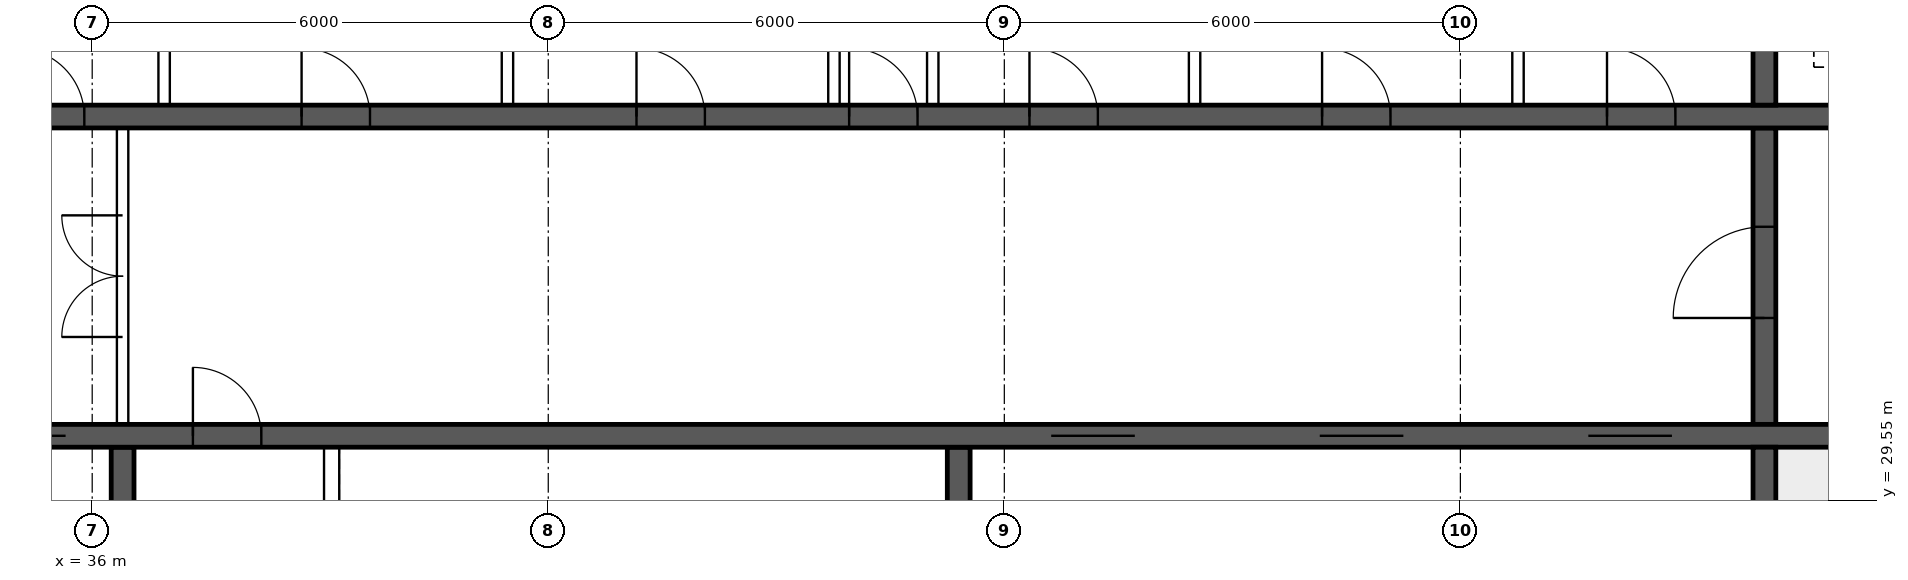
"""IFC4 building model, lengths in metres.
Left out: names, types, materials, properties, quantities, classifications, styles, units other than length and angle.
Written with IfcOpenShell. Run it as: python <this file> out.ifc"""

import sys

from ifc_helpers import new_model, si_unit, direction, frame, frame_2d, origin, place, context, subcontext, project, spatial, rectangle, extrude, element, fill, save


model = new_model("IFC4")
c1 = context("Model", 3, precision=1e-05, world=origin(), true_north=direction((0.0, 1.0)))
c2 = subcontext(c1, "Body", "Model", "MODEL_VIEW")
j1 = project(units=[si_unit("LENGTHUNIT", "METRE"), si_unit("PLANEANGLEUNIT", "RADIAN")], contexts=[c1])
p1 = place(None, origin())
s1 = spatial("IfcSite", under=j1, at=p1, CompositionType="ELEMENT")
p2 = place(p1, origin())
s2 = spatial("IfcBuilding", under=s1, at=p2, CompositionType="ELEMENT")
p3 = place(p2, frame((0.0, 0.0, 118.15)))
s3 = spatial("IfcBuildingStorey", under=s2, at=p3, CompositionType="ELEMENT", Elevation=118.15)
p4 = place(p3, frame((18.475, 30.4, 0.0), z_axis=(0.0, 0.0, 1.0), x_axis=(1.0, 0.0, 0.0)))
e1 = element("IfcWall", 1, at=p4, inside=s3, PredefinedType="SHEAR", context=c2, shape_type="SweptSolid", body=[
    extrude(rectangle(XDim=47.05, YDim=0.3, at=frame_2d((23.525, 0.0))), origin(), (0.0, 0.0, 1.0), 3.75),
])
p5 = place(p4, frame((0.4, 0.0, 0.0)))
e2 = element("IfcOpeningElement", 2, at=p5, cuts=e1, PredefinedType="OPENING", context=c2, shape_type="SweptSolid", body=[
    extrude(rectangle(XDim=1.0, YDim=2.1, at=frame_2d((0.5, 1.05))), frame((0.0, 0.16, 0.0), z_axis=(0.0, -1.0, 0.0), x_axis=(1.0, 0.0, 0.0)), (0.0, 0.0, 1.0), 0.32),
])
p6 = place(p4, frame((45.65, 0.0, 0.0)))
e3 = element("IfcOpeningElement", 3, at=p6, cuts=e1, PredefinedType="OPENING", context=c2, shape_type="SweptSolid", body=[
    extrude(rectangle(XDim=1.0, YDim=2.1, at=frame_2d((0.5, 1.05))), frame((0.0, 0.16, 0.0), z_axis=(0.0, -1.0, 0.0), x_axis=(1.0, 0.0, 0.0)), (0.0, 0.0, 1.0), 0.32),
])
p7 = place(p4, frame((8.275, 0.0, 0.0)))
e4 = element("IfcOpeningElement", 4, at=p7, cuts=e1, PredefinedType="OPENING", context=c2, shape_type="SweptSolid", body=[
    extrude(rectangle(XDim=1.1, YDim=2.1, at=frame_2d((0.55, 1.05))), frame((0.0, 0.16, 0.0), z_axis=(0.0, -1.0, 0.0), x_axis=(1.0, 0.0, 0.0)), (0.0, 0.0, 1.0), 0.32),
])
p8 = place(p4, frame((10.875, 0.0, 0.0)))
e5 = element("IfcOpeningElement", 5, at=p8, cuts=e1, PredefinedType="OPENING", context=c2, shape_type="SweptSolid", body=[
    extrude(rectangle(XDim=1.1, YDim=2.1, at=frame_2d((0.55, 1.05))), frame((0.0, 0.16, 0.0), z_axis=(0.0, -1.0, 0.0), x_axis=(1.0, 0.0, 0.0)), (0.0, 0.0, 1.0), 0.32),
])
p9 = place(p4, frame((13.475, 0.0, 0.0)))
e6 = element("IfcOpeningElement", 6, at=p9, cuts=e1, PredefinedType="OPENING", context=c2, shape_type="SweptSolid", body=[
    extrude(rectangle(XDim=1.1, YDim=2.1, at=frame_2d((0.55, 1.05))), frame((0.0, 0.16, 0.0), z_axis=(0.0, -1.0, 0.0), x_axis=(1.0, 0.0, 0.0)), (0.0, 0.0, 1.0), 0.32),
])
p10 = place(p4, frame((16.075, 0.0, 0.0)))
e7 = element("IfcOpeningElement", 7, at=p10, cuts=e1, PredefinedType="OPENING", context=c2, shape_type="SweptSolid", body=[
    extrude(rectangle(XDim=1.1, YDim=2.1, at=frame_2d((0.55, 1.05))), frame((0.0, 0.16, 0.0), z_axis=(0.0, -1.0, 0.0), x_axis=(1.0, 0.0, 0.0)), (0.0, 0.0, 1.0), 0.32),
])
p11 = place(p4, frame((18.85, 0.0, 0.0)))
e8 = element("IfcOpeningElement", 8, at=p11, cuts=e1, PredefinedType="OPENING", context=c2, shape_type="SweptSolid", body=[
    extrude(rectangle(XDim=0.9, YDim=2.1, at=frame_2d((0.45, 1.05))), frame((0.0, 0.16, 0.0), z_axis=(0.0, -1.0, 0.0), x_axis=(1.0, 0.0, 0.0)), (0.0, 0.0, 1.0), 0.32),
])
p12 = place(p4, frame((30.142, 0.0, 0.0)))
e9 = element("IfcOpeningElement", 9, at=p12, cuts=e1, PredefinedType="OPENING", context=c2, shape_type="SweptSolid", body=[
    extrude(rectangle(XDim=1.1, YDim=2.1, at=frame_2d((0.55, 1.05))), frame((0.0, 0.16, 0.0), z_axis=(0.0, -1.0, 0.0), x_axis=(1.0, 0.0, 0.0)), (0.0, 0.0, 1.0), 0.32),
])
p13 = place(p4, frame((33.675, 0.0, 0.0)))
e10 = element("IfcOpeningElement", 10, at=p13, cuts=e1, PredefinedType="OPENING", context=c2, shape_type="SweptSolid", body=[
    extrude(rectangle(XDim=1.1, YDim=2.1, at=frame_2d((0.55, 1.05))), frame((0.0, 0.16, 0.0), z_axis=(0.0, -1.0, 0.0), x_axis=(1.0, 0.0, 0.0)), (0.0, 0.0, 1.0), 0.32),
])
p14 = place(p4, frame((37.208, 0.0, 0.0)))
e11 = element("IfcOpeningElement", 11, at=p14, cuts=e1, PredefinedType="OPENING", context=c2, shape_type="SweptSolid", body=[
    extrude(rectangle(XDim=1.1, YDim=2.1, at=frame_2d((0.55, 1.05))), frame((0.0, 0.16, 0.0), z_axis=(0.0, -1.0, 0.0), x_axis=(1.0, 0.0, 0.0)), (0.0, 0.0, 1.0), 0.32),
])
p15 = place(p3, frame((18.475, 34.6, 0.0), z_axis=(0.0, 0.0, 1.0), x_axis=(1.0, 0.0, 0.0)))
e12 = element("IfcWall", 12, at=p15, inside=s3, PredefinedType="SHEAR", context=c2, shape_type="SweptSolid", body=[
    extrude(rectangle(XDim=47.05, YDim=0.3, at=frame_2d((23.525, 0.0))), origin(), (0.0, 0.0, 1.0), 3.75),
])
p16 = place(p15, frame((0.9, 0.0, 0.0)))
e13 = element("IfcOpeningElement", 13, at=p16, cuts=e12, PredefinedType="OPENING", context=c2, shape_type="SweptSolid", body=[
    extrude(rectangle(XDim=1.1, YDim=2.1, at=frame_2d((0.55, 1.05))), frame((0.0, 0.16, 0.0), z_axis=(0.0, -1.0, 0.0), x_axis=(1.0, 0.0, 0.0)), (0.0, 0.0, 1.0), 0.32),
])
p17 = place(p15, frame((45.05, 0.0, 0.0)))
e14 = element("IfcOpeningElement", 14, at=p17, cuts=e12, PredefinedType="OPENING", context=c2, shape_type="SweptSolid", body=[
    extrude(rectangle(XDim=1.1, YDim=2.1, at=frame_2d((0.55, 1.05))), frame((0.0, 0.16, 0.0), z_axis=(0.0, -1.0, 0.0), x_axis=(1.0, 0.0, 0.0)), (0.0, 0.0, 1.0), 0.32),
])
p18 = place(p15, frame((4.125, 0.0, 0.0)))
e15 = element("IfcOpeningElement", 15, at=p18, cuts=e12, PredefinedType="OPENING", context=c2, shape_type="SweptSolid", body=[
    extrude(rectangle(XDim=0.9, YDim=2.1, at=frame_2d((0.45, 1.05))), frame((0.0, 0.16, 0.0), z_axis=(0.0, -1.0, 0.0), x_axis=(1.0, 0.0, 0.0)), (0.0, 0.0, 1.0), 0.32),
])
p19 = place(p15, frame((42.025, 0.0, 0.0)))
e16 = element("IfcOpeningElement", 16, at=p19, cuts=e12, PredefinedType="OPENING", context=c2, shape_type="SweptSolid", body=[
    extrude(rectangle(XDim=0.9, YDim=2.1, at=frame_2d((0.45, 1.05))), frame((0.0, 0.16, 0.0), z_axis=(0.0, -1.0, 0.0), x_axis=(1.0, 0.0, 0.0)), (0.0, 0.0, 1.0), 0.32),
])
p20 = place(p15, frame((8.9, 0.0, 0.0)))
e17 = element("IfcOpeningElement", 17, at=p20, cuts=e12, PredefinedType="OPENING", context=c2, shape_type="SweptSolid", body=[
    extrude(rectangle(XDim=0.9, YDim=2.1, at=frame_2d((0.45, 1.05))), frame((0.0, 0.16, 0.0), z_axis=(0.0, -1.0, 0.0), x_axis=(1.0, 0.0, 0.0)), (0.0, 0.0, 1.0), 0.32),
])
p21 = place(p15, frame((12.874, 0.0, 0.0)))
e18 = element("IfcOpeningElement", 18, at=p21, cuts=e12, PredefinedType="OPENING", context=c2, shape_type="SweptSolid", body=[
    extrude(rectangle(XDim=0.9, YDim=2.1, at=frame_2d((0.45, 1.05))), frame((0.0, 0.16, 0.0), z_axis=(0.0, -1.0, 0.0), x_axis=(1.0, 0.0, 0.0)), (0.0, 0.0, 1.0), 0.32),
])
p22 = place(p15, frame((16.521, 0.0, 0.0)))
e19 = element("IfcOpeningElement", 19, at=p22, cuts=e12, PredefinedType="OPENING", context=c2, shape_type="SweptSolid", body=[
    extrude(rectangle(XDim=0.9, YDim=2.1, at=frame_2d((0.45, 1.05))), frame((0.0, 0.16, 0.0), z_axis=(0.0, -1.0, 0.0), x_axis=(1.0, 0.0, 0.0)), (0.0, 0.0, 1.0), 0.32),
])
p23 = place(p15, frame((20.28, 0.0, 0.0)))
e20 = element("IfcOpeningElement", 20, at=p23, cuts=e12, PredefinedType="OPENING", context=c2, shape_type="SweptSolid", body=[
    extrude(rectangle(XDim=0.9, YDim=2.1, at=frame_2d((0.45, 1.05))), frame((0.0, 0.16, 0.0), z_axis=(0.0, -1.0, 0.0), x_axis=(1.0, 0.0, 0.0)), (0.0, 0.0, 1.0), 0.32),
])
p24 = place(p15, frame((24.686, 0.0, 0.0)))
e21 = element("IfcOpeningElement", 21, at=p24, cuts=e12, PredefinedType="OPENING", context=c2, shape_type="SweptSolid", body=[
    extrude(rectangle(XDim=0.9, YDim=2.1, at=frame_2d((0.45, 1.05))), frame((0.0, 0.16, 0.0), z_axis=(0.0, -1.0, 0.0), x_axis=(1.0, 0.0, 0.0)), (0.0, 0.0, 1.0), 0.32),
])
p25 = place(p15, frame((27.483, 0.0, 0.0)))
e22 = element("IfcOpeningElement", 22, at=p25, cuts=e12, PredefinedType="OPENING", context=c2, shape_type="SweptSolid", body=[
    extrude(rectangle(XDim=0.9, YDim=2.1, at=frame_2d((0.45, 1.05))), frame((0.0, 0.16, 0.0), z_axis=(0.0, -1.0, 0.0), x_axis=(1.0, 0.0, 0.0)), (0.0, 0.0, 1.0), 0.32),
])
p26 = place(p15, frame((29.856, 0.0, 0.0)))
e23 = element("IfcOpeningElement", 23, at=p26, cuts=e12, PredefinedType="OPENING", context=c2, shape_type="SweptSolid", body=[
    extrude(rectangle(XDim=0.9, YDim=2.1, at=frame_2d((0.45, 1.05))), frame((0.0, 0.16, 0.0), z_axis=(0.0, -1.0, 0.0), x_axis=(1.0, 0.0, 0.0)), (0.0, 0.0, 1.0), 0.32),
])
p27 = place(p15, frame((33.706, 0.0, 0.0)))
e24 = element("IfcOpeningElement", 24, at=p27, cuts=e12, PredefinedType="OPENING", context=c2, shape_type="SweptSolid", body=[
    extrude(rectangle(XDim=0.9, YDim=2.1, at=frame_2d((0.45, 1.05))), frame((0.0, 0.16, 0.0), z_axis=(0.0, -1.0, 0.0), x_axis=(1.0, 0.0, 0.0)), (0.0, 0.0, 1.0), 0.32),
])
p28 = place(p15, frame((37.454, 0.0, 0.0)))
e25 = element("IfcOpeningElement", 25, at=p28, cuts=e12, PredefinedType="OPENING", context=c2, shape_type="SweptSolid", body=[
    extrude(rectangle(XDim=0.9, YDim=2.1, at=frame_2d((0.45, 1.05))), frame((0.0, 0.16, 0.0), z_axis=(0.0, -1.0, 0.0), x_axis=(1.0, 0.0, 0.0)), (0.0, 0.0, 1.0), 0.32),
])
p29 = place(p3, frame((58.0, 26.275, 0.0), z_axis=(0.0, 0.0, 1.0), x_axis=(0.0, 1.0, 0.0)))
e26 = element("IfcWall", 26, at=p29, inside=s3, PredefinedType="SHEAR", context=c2, shape_type="SweptSolid", body=[
    extrude(rectangle(XDim=3.975, YDim=0.3, at=frame_2d((1.988, 0.0))), origin(), (0.0, 0.0, 1.0), 3.75),
])
p30 = place(p3, frame((58.0, 30.55, 0.0), z_axis=(0.0, 0.0, 1.0), x_axis=(0.0, 1.0, 0.0)))
e27 = element("IfcWall", 27, at=p30, inside=s3, PredefinedType="SHEAR", context=c2, shape_type="SweptSolid", body=[
    extrude(rectangle(XDim=3.9, YDim=0.3, at=frame_2d((1.95, 0.0))), origin(), (0.0, 0.0, 1.0), 3.75),
])
p31 = place(p30, frame((1.4, 0.0, 0.0)))
e28 = element("IfcOpeningElement", 28, at=p31, cuts=e27, PredefinedType="OPENING", context=c2, shape_type="SweptSolid", body=[
    extrude(rectangle(XDim=1.2, YDim=2.1, at=frame_2d((0.6, 1.05))), frame((0.0, 0.16, 0.0), z_axis=(0.0, -1.0, 0.0), x_axis=(1.0, 0.0, 0.0)), (0.0, 0.0, 1.0), 0.32),
])
p32 = place(p3, frame((58.0, 34.75, 0.0), z_axis=(0.0, 0.0, 1.0), x_axis=(0.0, 1.0, 0.0)))
e29 = element("IfcWall", 29, at=p32, inside=s3, PredefinedType="SHEAR", context=c2, shape_type="SweptSolid", body=[
    extrude(rectangle(XDim=2.975, YDim=0.3, at=frame_2d((1.488, 0.0))), origin(), (0.0, 0.0, 1.0), 3.75),
])
for number, where, z_axis, x_axis in (
    (30, (36.4, 26.275, 0.0), (0.0, 0.0, 1.0), (0.0, 1.0, 0.0)),
    (31, (47.4, 26.275, 0.0), (0.0, 0.0, 1.0), (0.0, 1.0, 0.0)),
):
    element("IfcWall", number, at=place(p3, frame(where, z_axis=z_axis, x_axis=x_axis)), inside=s3, PredefinedType="SHEAR", context=c2, shape_type="SweptSolid", body=[
        extrude(rectangle(XDim=3.975, YDim=0.3, at=frame_2d((1.988, 0.0))), origin(), (0.0, 0.0, 1.0), 3.75),
    ])
p33 = place(p3, frame((36.4, 30.55, 0.0), z_axis=(0.0, 0.0, 1.0), x_axis=(0.0, 1.0, 0.0)))
e32 = element("IfcWall", 32, at=p33, inside=s3, PredefinedType="SOLIDWALL", context=c2, shape_type="SweptSolid", body=[
    extrude(rectangle(XDim=3.9, YDim=0.15, at=frame_2d((1.95, 0.0))), origin(), (0.0, 0.0, 1.0), 3.5),
])
p34 = place(p33, frame((1.15, 0.0, 0.0)))
e33 = element("IfcOpeningElement", 33, at=p34, cuts=e32, PredefinedType="OPENING", context=c2, shape_type="SweptSolid", body=[
    extrude(rectangle(XDim=1.6, YDim=2.1, at=frame_2d((0.8, 1.05))), frame((0.0, 0.085, 0.0), z_axis=(0.0, -1.0, 0.0), x_axis=(1.0, 0.0, 0.0)), (0.0, 0.0, 1.0), 0.17),
])
for number, where, z_axis, x_axis in (
    (34, (36.946, 34.75, 0.0), (0.0, 0.0, 1.0), (0.0, 1.0, 0.0)),
    (35, (41.463, 34.75, 0.0), (0.0, 0.0, 1.0), (0.0, 1.0, 0.0)),
    (36, (45.758, 34.75, 0.0), (0.0, 0.0, 1.0), (0.0, 1.0, 0.0)),
    (37, (47.058, 34.75, 0.0), (0.0, 0.0, 1.0), (0.0, 1.0, 0.0)),
    (38, (50.503, 34.75, 0.0), (0.0, 0.0, 1.0), (0.0, 1.0, 0.0)),
    (39, (54.758, 34.75, 0.0), (0.0, 0.0, 1.0), (0.0, 1.0, 0.0)),
):
    element("IfcWall", number, at=place(p3, frame(where, z_axis=z_axis, x_axis=x_axis)), inside=s3, PredefinedType="SOLIDWALL", context=c2, shape_type="SweptSolid", body=[
        extrude(rectangle(XDim=2.975, YDim=0.15, at=frame_2d((1.488, 0.0))), origin(), (0.0, 0.0, 1.0), 3.5),
    ])
p35 = place(p3, frame((39.15, 26.275, 0.0), z_axis=(0.0, 0.0, 1.0), x_axis=(0.0, 1.0, 0.0)))
e40 = element("IfcWall", 40, at=p35, inside=s3, PredefinedType="SOLIDWALL", context=c2, shape_type="SweptSolid", body=[
    extrude(rectangle(XDim=3.975, YDim=0.2, at=frame_2d((1.988, 0.0))), origin(), (0.0, 0.0, 1.0), 3.5),
])
p36 = place(p34, origin())
e41 = element("IfcDoor", 41, at=p36, inside=s3, OperationType="DOUBLE_DOOR_SINGLE_SWING", PredefinedType="DOOR", context=c2, shape_type="SweptSolid", body=[
    extrude(rectangle(XDim=1.6, YDim=2.1, at=frame_2d((0.8, 1.05))), frame((0.0, 0.025, 0.0), z_axis=(0.0, -1.0, 0.0), x_axis=(1.0, 0.0, 0.0)), (0.0, 0.0, 1.0), 0.05),
])
fill(e33, e41)
p37 = place(p31, origin())
e42 = element("IfcDoor", 42, at=p37, inside=s3, OperationType="SINGLE_SWING_LEFT", PredefinedType="DOOR", context=c2, shape_type="SweptSolid", body=[
    extrude(rectangle(XDim=1.2, YDim=2.1, at=frame_2d((0.6, 1.05))), frame((0.0, 0.025, 0.0), z_axis=(0.0, -1.0, 0.0), x_axis=(1.0, 0.0, 0.0)), (0.0, 0.0, 1.0), 0.05),
])
fill(e28, e42)
p38 = place(p22, origin())
e43 = element("IfcDoor", 43, at=p38, inside=s3, OperationType="SINGLE_SWING_LEFT", PredefinedType="DOOR", context=c2, shape_type="SweptSolid", body=[
    extrude(rectangle(XDim=0.9, YDim=2.1, at=frame_2d((0.45, 1.05))), frame((0.0, 0.025, 0.0), z_axis=(0.0, -1.0, 0.0), x_axis=(1.0, 0.0, 0.0)), (0.0, 0.0, 1.0), 0.05),
])
fill(e19, e43)
p39 = place(p23, origin())
e44 = element("IfcDoor", 44, at=p39, inside=s3, OperationType="SINGLE_SWING_LEFT", PredefinedType="DOOR", context=c2, shape_type="SweptSolid", body=[
    extrude(rectangle(XDim=0.9, YDim=2.1, at=frame_2d((0.45, 1.05))), frame((0.0, 0.025, 0.0), z_axis=(0.0, -1.0, 0.0), x_axis=(1.0, 0.0, 0.0)), (0.0, 0.0, 1.0), 0.05),
])
fill(e20, e44)
p40 = place(p24, origin())
e45 = element("IfcDoor", 45, at=p40, inside=s3, OperationType="SINGLE_SWING_LEFT", PredefinedType="DOOR", context=c2, shape_type="SweptSolid", body=[
    extrude(rectangle(XDim=0.9, YDim=2.1, at=frame_2d((0.45, 1.05))), frame((0.0, 0.025, 0.0), z_axis=(0.0, -1.0, 0.0), x_axis=(1.0, 0.0, 0.0)), (0.0, 0.0, 1.0), 0.05),
])
fill(e21, e45)
p41 = place(p25, origin())
e46 = element("IfcDoor", 46, at=p41, inside=s3, OperationType="SINGLE_SWING_LEFT", PredefinedType="DOOR", context=c2, shape_type="SweptSolid", body=[
    extrude(rectangle(XDim=0.9, YDim=2.1, at=frame_2d((0.45, 1.05))), frame((0.0, 0.025, 0.0), z_axis=(0.0, -1.0, 0.0), x_axis=(1.0, 0.0, 0.0)), (0.0, 0.0, 1.0), 0.05),
])
fill(e22, e46)
p42 = place(p26, origin())
e47 = element("IfcDoor", 47, at=p42, inside=s3, OperationType="SINGLE_SWING_LEFT", PredefinedType="DOOR", context=c2, shape_type="SweptSolid", body=[
    extrude(rectangle(XDim=0.9, YDim=2.1, at=frame_2d((0.45, 1.05))), frame((0.0, 0.025, 0.0), z_axis=(0.0, -1.0, 0.0), x_axis=(1.0, 0.0, 0.0)), (0.0, 0.0, 1.0), 0.05),
])
fill(e23, e47)
p43 = place(p27, origin())
e48 = element("IfcDoor", 48, at=p43, inside=s3, OperationType="SINGLE_SWING_LEFT", PredefinedType="DOOR", context=c2, shape_type="SweptSolid", body=[
    extrude(rectangle(XDim=0.9, YDim=2.1, at=frame_2d((0.45, 1.05))), frame((0.0, 0.025, 0.0), z_axis=(0.0, -1.0, 0.0), x_axis=(1.0, 0.0, 0.0)), (0.0, 0.0, 1.0), 0.05),
])
fill(e24, e48)
p44 = place(p28, origin())
e49 = element("IfcDoor", 49, at=p44, inside=s3, OperationType="SINGLE_SWING_LEFT", PredefinedType="DOOR", context=c2, shape_type="SweptSolid", body=[
    extrude(rectangle(XDim=0.9, YDim=2.1, at=frame_2d((0.45, 1.05))), frame((0.0, 0.025, 0.0), z_axis=(0.0, -1.0, 0.0), x_axis=(1.0, 0.0, 0.0)), (0.0, 0.0, 1.0), 0.05),
])
fill(e25, e49)
p45 = place(p10, origin())
e50 = element("IfcDoor", 50, at=p45, inside=s3, OperationType="DOUBLE_DOOR_SLIDING", PredefinedType="DOOR", context=c2, shape_type="SweptSolid", body=[
    extrude(rectangle(XDim=1.1, YDim=2.1, at=frame_2d((0.55, 1.05))), frame((0.0, 0.025, 0.0), z_axis=(0.0, -1.0, 0.0), x_axis=(1.0, 0.0, 0.0)), (0.0, 0.0, 1.0), 0.05),
])
fill(e7, e50)
p46 = place(p11, origin())
e51 = element("IfcDoor", 51, at=p46, inside=s3, OperationType="SINGLE_SWING_LEFT", PredefinedType="DOOR", context=c2, shape_type="SweptSolid", body=[
    extrude(rectangle(XDim=0.9, YDim=2.1, at=frame_2d((0.45, 1.05))), frame((0.0, 0.025, 0.0), z_axis=(0.0, -1.0, 0.0), x_axis=(1.0, 0.0, 0.0)), (0.0, 0.0, 1.0), 0.05),
])
fill(e8, e51)
p47 = place(p12, origin())
e52 = element("IfcDoor", 52, at=p47, inside=s3, OperationType="DOUBLE_DOOR_SLIDING", PredefinedType="DOOR", context=c2, shape_type="SweptSolid", body=[
    extrude(rectangle(XDim=1.1, YDim=2.1, at=frame_2d((0.55, 1.05))), frame((0.0, 0.025, 0.0), z_axis=(0.0, -1.0, 0.0), x_axis=(1.0, 0.0, 0.0)), (0.0, 0.0, 1.0), 0.05),
])
fill(e9, e52)
p48 = place(p13, origin())
e53 = element("IfcDoor", 53, at=p48, inside=s3, OperationType="DOUBLE_DOOR_SLIDING", PredefinedType="DOOR", context=c2, shape_type="SweptSolid", body=[
    extrude(rectangle(XDim=1.1, YDim=2.1, at=frame_2d((0.55, 1.05))), frame((0.0, 0.025, 0.0), z_axis=(0.0, -1.0, 0.0), x_axis=(1.0, 0.0, 0.0)), (0.0, 0.0, 1.0), 0.05),
])
fill(e10, e53)
p49 = place(p14, origin())
e54 = element("IfcDoor", 54, at=p49, inside=s3, OperationType="DOUBLE_DOOR_SLIDING", PredefinedType="DOOR", context=c2, shape_type="SweptSolid", body=[
    extrude(rectangle(XDim=1.1, YDim=2.1, at=frame_2d((0.55, 1.05))), frame((0.0, 0.025, 0.0), z_axis=(0.0, -1.0, 0.0), x_axis=(1.0, 0.0, 0.0)), (0.0, 0.0, 1.0), 0.05),
])
fill(e11, e54)
save(model, sys.argv[1])
